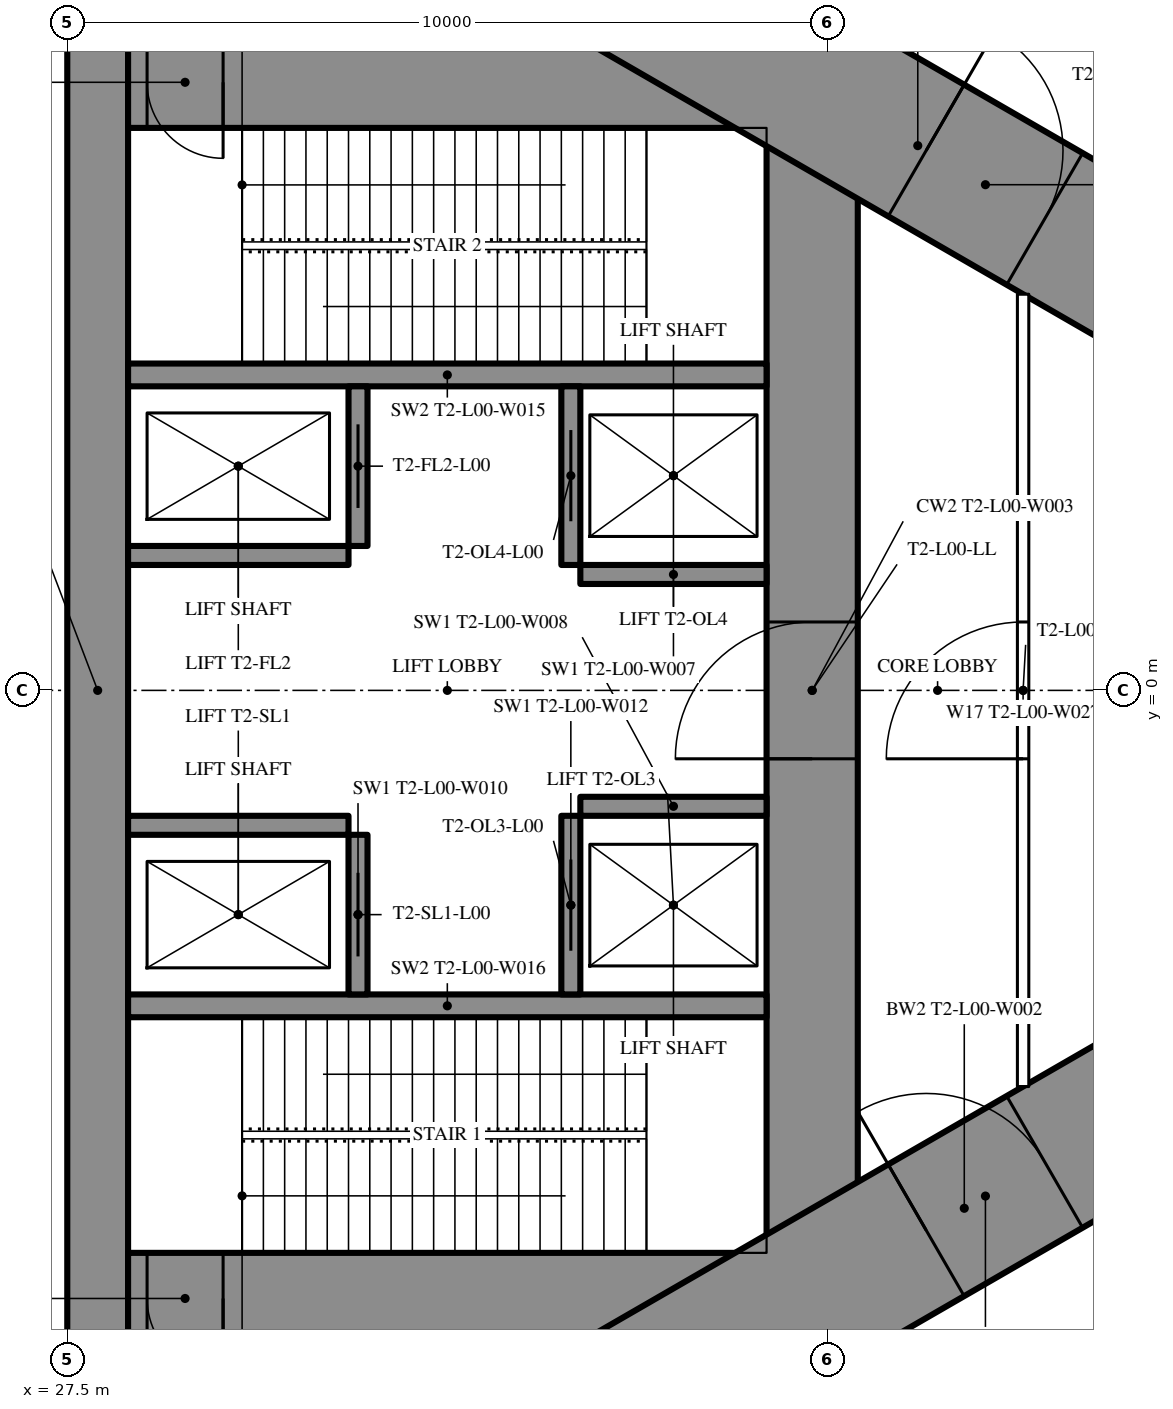
"""IFC4 building model, lengths in metres.
Left out: names, types, materials, properties, quantities, classifications, styles, units other than length and angle.
Written with IfcOpenShell. Run it as: python <this file> out.ifc"""

import sys

from ifc_helpers import new_model, si_unit, direction, frame, frame_2d, origin, place, context, subcontext, project, spatial, rectangle, extrude, element, fill, save


model = new_model("IFC4")
c1 = context("Model", 3, precision=1e-05, world=origin(), true_north=direction((0.0, 1.0)))
c2 = subcontext(c1, "Body", "Model", "MODEL_VIEW")
j1 = project(units=[si_unit("LENGTHUNIT", "METRE"), si_unit("PLANEANGLEUNIT", "RADIAN")], contexts=[c1])
p1 = place(None, origin())
s1 = spatial("IfcSite", under=j1, at=p1, CompositionType="ELEMENT")
p2 = place(p1, origin())
s2 = spatial("IfcBuilding", under=s1, at=p2, CompositionType="ELEMENT")
p3 = place(p2, origin())
s3 = spatial("IfcBuildingStorey", under=s2, at=p3, CompositionType="ELEMENT", Elevation=0.0)
p4 = place(p3, frame((27.9, -8.6, 0.0), z_axis=(0.0, 0.0, 1.0), x_axis=(0.0, 1.0, 0.0)))
e1 = element("IfcWall", 1, at=p4, inside=s3, PredefinedType="SHEAR", context=c2, shape_type="SweptSolid", body=[
    extrude(rectangle(XDim=17.2, YDim=0.8, at=frame_2d((8.6, 0.0))), origin(), (0.0, 0.0, 1.0), 7.2),
])
p5 = place(p3, frame((37.3, -8.6, 0.0), z_axis=(0.0, 0.0, 1.0), x_axis=(0.0, 1.0, 0.0)))
e2 = element("IfcWall", 2, at=p5, inside=s3, PredefinedType="SHEAR", context=c2, shape_type="SweptSolid", body=[
    extrude(rectangle(XDim=17.2, YDim=1.2, at=frame_2d((8.6, 0.0))), origin(), (0.0, 0.0, 1.0), 7.2),
])
p6 = place(p5, frame((7.7, 0.0, 0.0)))
e3 = element("IfcOpeningElement", 3, at=p6, cuts=e2, PredefinedType="OPENING", context=c2, shape_type="SweptSolid", body=[
    extrude(rectangle(XDim=1.8, YDim=2.2, at=frame_2d((0.9, 1.1))), frame((0.0, 0.61, 0.0), z_axis=(0.0, -1.0, 0.0), x_axis=(1.0, 0.0, 0.0)), (0.0, 0.0, 1.0), 1.22),
])
p7 = place(p3, frame((28.3, -8.0, 0.0), z_axis=(0.0, 0.0, 1.0), x_axis=(1.0, 0.0, 0.0)))
e4 = element("IfcWall", 4, at=p7, inside=s3, PredefinedType="SHEAR", context=c2, shape_type="SweptSolid", body=[
    extrude(rectangle(XDim=8.4, YDim=1.2, at=frame_2d((4.2, 0.0))), origin(), (0.0, 0.0, 1.0), 7.2),
])
p8 = place(p7, frame((0.25, 0.0, 0.0)))
e5 = element("IfcOpeningElement", 5, at=p8, cuts=e4, PredefinedType="OPENING", context=c2, shape_type="SweptSolid", body=[
    extrude(rectangle(XDim=1.0, YDim=2.2, at=frame_2d((0.5, 1.1))), frame((0.0, 0.61, 0.0), z_axis=(0.0, -1.0, 0.0), x_axis=(1.0, 0.0, 0.0)), (0.0, 0.0, 1.0), 1.22),
])
p9 = place(p3, frame((28.3, 8.0, 0.0), z_axis=(0.0, 0.0, 1.0), x_axis=(1.0, 0.0, 0.0)))
e6 = element("IfcWall", 6, at=p9, inside=s3, PredefinedType="SHEAR", context=c2, shape_type="SweptSolid", body=[
    extrude(rectangle(XDim=8.4, YDim=1.2, at=frame_2d((4.2, 0.0))), origin(), (0.0, 0.0, 1.0), 7.2),
])
p10 = place(p9, frame((0.25, 0.0, 0.0)))
e7 = element("IfcOpeningElement", 7, at=p10, cuts=e6, PredefinedType="OPENING", context=c2, shape_type="SweptSolid", body=[
    extrude(rectangle(XDim=1.0, YDim=2.2, at=frame_2d((0.5, 1.1))), frame((0.0, 0.61, 0.0), z_axis=(0.0, -1.0, 0.0), x_axis=(1.0, 0.0, 0.0)), (0.0, 0.0, 1.0), 1.22),
])
for number, where, z_axis, x_axis in (
    (8, (28.3, -4.15, 0.0), (0.0, 0.0, 1.0), (1.0, 0.0, 0.0)),
    (9, (28.3, 4.15, 0.0), (0.0, 0.0, 1.0), (1.0, 0.0, 0.0)),
):
    element("IfcWall", number, at=place(p3, frame(where, z_axis=z_axis, x_axis=x_axis)), inside=s3, PredefinedType="SHEAR", context=c2, shape_type="SweptSolid", body=[
        extrude(rectangle(XDim=8.4, YDim=0.3, at=frame_2d((4.2, 0.0))), origin(), (0.0, 0.0, 1.0), 7.2),
    ])
p11 = place(p3, frame((31.325, -4.0, 0.0), z_axis=(0.0, 0.0, 1.0), x_axis=(0.0, 1.0, 0.0)))
e10 = element("IfcWall", 10, at=p11, inside=s3, PredefinedType="SHEAR", context=c2, shape_type="SweptSolid", body=[
    extrude(rectangle(XDim=2.1, YDim=0.25, at=frame_2d((1.05, 0.0))), origin(), (0.0, 0.0, 1.0), 7.2),
])
p12 = place(p11, frame((0.5, 0.0, 0.0)))
e11 = element("IfcOpeningElement", 11, at=p12, cuts=e10, PredefinedType="OPENING", context=c2, shape_type="SweptSolid", body=[
    extrude(rectangle(XDim=1.1, YDim=2.2, at=frame_2d((0.55, 1.1))), frame((0.0, 0.135, 0.0), z_axis=(0.0, -1.0, 0.0), x_axis=(1.0, 0.0, 0.0)), (0.0, 0.0, 1.0), 0.27),
])
p13 = place(p3, frame((34.125, -4.0, 0.0), z_axis=(0.0, 0.0, 1.0), x_axis=(0.0, 1.0, 0.0)))
e12 = element("IfcWall", 12, at=p13, inside=s3, PredefinedType="SHEAR", context=c2, shape_type="SweptSolid", body=[
    extrude(rectangle(XDim=2.35, YDim=0.25, at=frame_2d((1.175, 0.0))), origin(), (0.0, 0.0, 1.0), 7.2),
])
p14 = place(p13, frame((0.575, 0.0, 0.0)))
e13 = element("IfcOpeningElement", 13, at=p14, cuts=e12, PredefinedType="OPENING", context=c2, shape_type="SweptSolid", body=[
    extrude(rectangle(XDim=1.2, YDim=2.2, at=frame_2d((0.6, 1.1))), frame((0.0, 0.135, 0.0), z_axis=(0.0, -1.0, 0.0), x_axis=(1.0, 0.0, 0.0)), (0.0, 0.0, 1.0), 0.27),
])
p15 = place(p3, frame((28.3, -1.775, 0.0), z_axis=(0.0, 0.0, 1.0), x_axis=(1.0, 0.0, 0.0)))
e14 = element("IfcWall", 14, at=p15, inside=s3, PredefinedType="SHEAR", context=c2, shape_type="SweptSolid", body=[
    extrude(rectangle(XDim=2.9, YDim=0.25, at=frame_2d((1.45, 0.0))), origin(), (0.0, 0.0, 1.0), 7.2),
])
p16 = place(p3, frame((34.25, -1.525, 0.0), z_axis=(0.0, 0.0, 1.0), x_axis=(1.0, 0.0, 0.0)))
e15 = element("IfcWall", 15, at=p16, inside=s3, PredefinedType="SHEAR", context=c2, shape_type="SweptSolid", body=[
    extrude(rectangle(XDim=2.45, YDim=0.25, at=frame_2d((1.225, 0.0))), origin(), (0.0, 0.0, 1.0), 7.2),
])
p17 = place(p3, frame((31.325, 1.9, 0.0), z_axis=(0.0, 0.0, 1.0), x_axis=(0.0, 1.0, 0.0)))
e16 = element("IfcWall", 16, at=p17, inside=s3, PredefinedType="SHEAR", context=c2, shape_type="SweptSolid", body=[
    extrude(rectangle(XDim=2.1, YDim=0.25, at=frame_2d((1.05, 0.0))), origin(), (0.0, 0.0, 1.0), 7.2),
])
p18 = place(p17, frame((0.5, 0.0, 0.0)))
e17 = element("IfcOpeningElement", 17, at=p18, cuts=e16, PredefinedType="OPENING", context=c2, shape_type="SweptSolid", body=[
    extrude(rectangle(XDim=1.1, YDim=2.2, at=frame_2d((0.55, 1.1))), frame((0.0, 0.135, 0.0), z_axis=(0.0, -1.0, 0.0), x_axis=(1.0, 0.0, 0.0)), (0.0, 0.0, 1.0), 0.27),
])
p19 = place(p3, frame((34.125, 1.65, 0.0), z_axis=(0.0, 0.0, 1.0), x_axis=(0.0, 1.0, 0.0)))
e18 = element("IfcWall", 18, at=p19, inside=s3, PredefinedType="SHEAR", context=c2, shape_type="SweptSolid", body=[
    extrude(rectangle(XDim=2.35, YDim=0.25, at=frame_2d((1.175, 0.0))), origin(), (0.0, 0.0, 1.0), 7.2),
])
p20 = place(p19, frame((0.575, 0.0, 0.0)))
e19 = element("IfcOpeningElement", 19, at=p20, cuts=e18, PredefinedType="OPENING", context=c2, shape_type="SweptSolid", body=[
    extrude(rectangle(XDim=1.2, YDim=2.2, at=frame_2d((0.6, 1.1))), frame((0.0, 0.135, 0.0), z_axis=(0.0, -1.0, 0.0), x_axis=(1.0, 0.0, 0.0)), (0.0, 0.0, 1.0), 0.27),
])
p21 = place(p3, frame((28.3, 1.775, 0.0), z_axis=(0.0, 0.0, 1.0), x_axis=(1.0, 0.0, 0.0)))
e20 = element("IfcWall", 20, at=p21, inside=s3, PredefinedType="SHEAR", context=c2, shape_type="SweptSolid", body=[
    extrude(rectangle(XDim=2.9, YDim=0.25, at=frame_2d((1.45, 0.0))), origin(), (0.0, 0.0, 1.0), 7.2),
])
p22 = place(p3, frame((34.25, 1.525, 0.0), z_axis=(0.0, 0.0, 1.0), x_axis=(1.0, 0.0, 0.0)))
e21 = element("IfcWall", 21, at=p22, inside=s3, PredefinedType="SHEAR", context=c2, shape_type="SweptSolid", body=[
    extrude(rectangle(XDim=2.45, YDim=0.25, at=frame_2d((1.225, 0.0))), origin(), (0.0, 0.0, 1.0), 7.2),
])
p23 = place(p3, frame((27.2, -13.8, 0.0), z_axis=(0.0, 0.0, 1.0), x_axis=(0.866027159892, 0.499996958321, 0.0)))
e22 = element("IfcWall", 22, at=p23, inside=s3, PredefinedType="SHEAR", context=c2, shape_type="SweptSolid", body=[
    extrude(rectangle(XDim=27.947, YDim=2.0, at=frame_2d((13.973, 0.0))), origin(), (0.0, 0.0, 1.0), 7.2),
])
p24 = place(p23, frame((4.6, 0.0, 0.0)))
e23 = element("IfcOpeningElement", 23, at=p24, cuts=e22, PredefinedType="OPENING", context=c2, shape_type="SweptSolid", body=[
    extrude(rectangle(XDim=1.0, YDim=2.2, at=frame_2d((0.5, 1.1))), frame((0.0, 1.01, 0.0), z_axis=(0.0, -1.0, 0.0), x_axis=(1.0, 0.0, 0.0)), (0.0, 0.0, 1.0), 2.02),
])
p25 = place(p23, frame((13.395, 0.0, 0.0)))
e24 = element("IfcOpeningElement", 24, at=p25, cuts=e22, PredefinedType="OPENING", context=c2, shape_type="SweptSolid", body=[
    extrude(rectangle(XDim=1.8, YDim=2.2, at=frame_2d((0.9, 1.1))), frame((0.0, 1.01, 0.0), z_axis=(0.0, -1.0, 0.0), x_axis=(1.0, 0.0, 0.0)), (0.0, 0.0, 1.0), 2.02),
])
p26 = place(p3, frame((27.2, 13.8, 0.0), z_axis=(0.0, 0.0, 1.0), x_axis=(0.866024545924, -0.500001485854, 0.0)))
e25 = element("IfcWall", 25, at=p26, inside=s3, PredefinedType="SHEAR", context=c2, shape_type="SweptSolid", body=[
    extrude(rectangle(XDim=26.534, YDim=2.0, at=frame_2d((13.267, 0.0))), origin(), (0.0, 0.0, 1.0), 7.2),
])
p27 = place(p26, frame((4.6, 0.0, 0.0)))
e26 = element("IfcOpeningElement", 26, at=p27, cuts=e25, PredefinedType="OPENING", context=c2, shape_type="SweptSolid", body=[
    extrude(rectangle(XDim=1.0, YDim=2.2, at=frame_2d((0.5, 1.1))), frame((0.0, 1.01, 0.0), z_axis=(0.0, -1.0, 0.0), x_axis=(1.0, 0.0, 0.0)), (0.0, 0.0, 1.0), 2.02),
])
p28 = place(p26, frame((13.395, 0.0, 0.0)))
e27 = element("IfcOpeningElement", 27, at=p28, cuts=e25, PredefinedType="OPENING", context=c2, shape_type="SweptSolid", body=[
    extrude(rectangle(XDim=1.8, YDim=2.2, at=frame_2d((0.9, 1.1))), frame((0.0, 1.01, 0.0), z_axis=(0.0, -1.0, 0.0), x_axis=(1.0, 0.0, 0.0)), (0.0, 0.0, 1.0), 2.02),
])
p29 = place(p3, frame((38.16, -10.59, 0.0), z_axis=(0.0, 0.0, 1.0), x_axis=(0.866027029586, 0.499997184019, 0.0)))
e28 = element("IfcWall", 28, at=p29, inside=s3, PredefinedType="PARTITIONING", context=c2, shape_type="SweptSolid", body=[
    extrude(rectangle(XDim=21.18, YDim=0.2, at=frame_2d((10.59, 0.0))), origin(), (0.0, 0.0, 1.0), 6.85),
])
p30 = place(p29, frame((14.142, 0.0, 0.0)))
e29 = element("IfcOpeningElement", 29, at=p30, cuts=e28, PredefinedType="OPENING", context=c2, shape_type="SweptSolid", body=[
    extrude(rectangle(XDim=1.8, YDim=2.2, at=frame_2d((0.9, 1.1))), frame((0.0, 0.11, 0.0), z_axis=(0.0, -1.0, 0.0), x_axis=(1.0, 0.0, 0.0)), (0.0, 0.0, 1.0), 0.22),
])
p31 = place(p29, frame((18.183, 0.0, 0.0)))
e30 = element("IfcOpeningElement", 30, at=p31, cuts=e28, PredefinedType="OPENING", context=c2, shape_type="SweptSolid", body=[
    extrude(rectangle(XDim=1.8, YDim=2.2, at=frame_2d((0.9, 1.1))), frame((0.0, 0.11, 0.0), z_axis=(0.0, -1.0, 0.0), x_axis=(1.0, 0.0, 0.0)), (0.0, 0.0, 1.0), 0.22),
])
p32 = place(p29, frame((5.65, 0.0, 0.0)))
e31 = element("IfcOpeningElement", 31, at=p32, cuts=e28, PredefinedType="OPENING", context=c2, shape_type="SweptSolid", body=[
    extrude(rectangle(XDim=1.8, YDim=2.2, at=frame_2d((0.9, 1.1))), frame((0.0, 0.11, 0.0), z_axis=(0.0, -1.0, 0.0), x_axis=(1.0, 0.0, 0.0)), (0.0, 0.0, 1.0), 0.22),
])
p33 = place(p3, frame((37.034, 11.24, 0.0), z_axis=(0.0, 0.0, 1.0), x_axis=(0.866025942536, -0.499999066854, 0.0)))
e32 = element("IfcWall", 32, at=p33, inside=s3, PredefinedType="PARTITIONING", context=c2, shape_type="SweptSolid", body=[
    extrude(rectangle(XDim=22.36, YDim=0.2, at=frame_2d((11.18, 0.0))), origin(), (0.0, 0.0, 1.0), 6.85),
])
p34 = place(p33, frame((19.423, 0.0, 0.0)))
e33 = element("IfcOpeningElement", 33, at=p34, cuts=e32, PredefinedType="OPENING", context=c2, shape_type="SweptSolid", body=[
    extrude(rectangle(XDim=1.8, YDim=2.2, at=frame_2d((0.9, 1.1))), frame((0.0, 0.11, 0.0), z_axis=(0.0, -1.0, 0.0), x_axis=(1.0, 0.0, 0.0)), (0.0, 0.0, 1.0), 0.22),
])
p35 = place(p33, frame((13.174, 0.0, 0.0)))
e34 = element("IfcOpeningElement", 34, at=p35, cuts=e32, PredefinedType="OPENING", context=c2, shape_type="SweptSolid", body=[
    extrude(rectangle(XDim=2.0, YDim=2.4, at=frame_2d((1.0, 1.2))), frame((0.0, 0.11, 0.0), z_axis=(0.0, -1.0, 0.0), x_axis=(1.0, 0.0, 0.0)), (0.0, 0.0, 1.0), 0.22),
])
p36 = place(p33, frame((4.602, 0.0, 0.0)))
e35 = element("IfcOpeningElement", 35, at=p36, cuts=e32, PredefinedType="OPENING", context=c2, shape_type="SweptSolid", body=[
    extrude(rectangle(XDim=1.8, YDim=2.2, at=frame_2d((0.9, 1.1))), frame((0.0, 0.11, 0.0), z_axis=(0.0, -1.0, 0.0), x_axis=(1.0, 0.0, 0.0)), (0.0, 0.0, 1.0), 0.22),
])
p37 = place(p3, frame((40.075, -5.212, 0.0), z_axis=(0.0, 0.0, 1.0), x_axis=(0.0, 1.0, 0.0)))
e36 = element("IfcWall", 36, at=p37, inside=s3, PredefinedType="PARTITIONING", context=c2, shape_type="SweptSolid", body=[
    extrude(rectangle(XDim=10.424, YDim=0.15, at=frame_2d((5.212, 0.0))), origin(), (0.0, 0.0, 1.0), 6.85),
])
p38 = place(p37, frame((4.312, 0.0, 0.0)))
e37 = element("IfcOpeningElement", 37, at=p38, cuts=e36, PredefinedType="OPENING", context=c2, shape_type="SweptSolid", body=[
    extrude(rectangle(XDim=1.8, YDim=2.2, at=frame_2d((0.9, 1.1))), frame((0.0, 0.085, 0.0), z_axis=(0.0, -1.0, 0.0), x_axis=(1.0, 0.0, 0.0)), (0.0, 0.0, 1.0), 0.17),
])
p39 = place(p3, frame((4.625, -4.95, 0.0), z_axis=(0.0, 0.0, 1.0), x_axis=(1.0, 0.0, 0.0)))
e38 = element("IfcWall", 38, at=p39, inside=s3, PredefinedType="PARTITIONING", context=c2, shape_type="SweptSolid", body=[
    extrude(rectangle(XDim=22.875, YDim=0.15, at=frame_2d((11.438, 0.0))), origin(), (0.0, 0.0, 1.0), 5.85),
])
p40 = place(p39, frame((9.0, 0.0, 0.0)))
e39 = element("IfcOpeningElement", 39, at=p40, cuts=e38, PredefinedType="OPENING", context=c2, shape_type="SweptSolid", body=[
    extrude(rectangle(XDim=1.8, YDim=2.2, at=frame_2d((0.9, 1.1))), frame((0.0, 0.085, 0.0), z_axis=(0.0, -1.0, 0.0), x_axis=(1.0, 0.0, 0.0)), (0.0, 0.0, 1.0), 0.17),
])
p41 = place(p38, origin())
e40 = element("IfcDoor", 40, at=p41, inside=s3, OperationType="DOUBLE_DOOR_SINGLE_SWING", PredefinedType="DOOR", context=c2, shape_type="SweptSolid", body=[
    extrude(rectangle(XDim=1.8, YDim=2.2, at=frame_2d((0.9, 1.1))), frame((0.0, 0.025, 0.0), z_axis=(0.0, -1.0, 0.0), x_axis=(1.0, 0.0, 0.0)), (0.0, 0.0, 1.0), 0.05),
])
fill(e37, e40)
p42 = place(p25, origin())
e41 = element("IfcDoor", 41, at=p42, inside=s3, OperationType="DOUBLE_DOOR_SINGLE_SWING", PredefinedType="DOOR", context=c2, shape_type="SweptSolid", body=[
    extrude(rectangle(XDim=1.8, YDim=2.2, at=frame_2d((0.9, 1.1))), frame((0.0, 0.025, 0.0), z_axis=(0.0, -1.0, 0.0), x_axis=(1.0, 0.0, 0.0)), (0.0, 0.0, 1.0), 0.05),
])
fill(e24, e41)
p43 = place(p28, origin())
e42 = element("IfcDoor", 42, at=p43, inside=s3, OperationType="DOUBLE_DOOR_SINGLE_SWING", PredefinedType="DOOR", context=c2, shape_type="SweptSolid", body=[
    extrude(rectangle(XDim=1.8, YDim=2.2, at=frame_2d((0.9, 1.1))), frame((0.0, 0.025, 0.0), z_axis=(0.0, -1.0, 0.0), x_axis=(1.0, 0.0, 0.0)), (0.0, 0.0, 1.0), 0.05),
])
fill(e27, e42)
p44 = place(p6, origin())
e43 = element("IfcDoor", 43, at=p44, inside=s3, OperationType="DOUBLE_DOOR_SINGLE_SWING", PredefinedType="DOOR", context=c2, shape_type="SweptSolid", body=[
    extrude(rectangle(XDim=1.8, YDim=2.2, at=frame_2d((0.9, 1.1))), frame((0.0, 0.025, 0.0), z_axis=(0.0, -1.0, 0.0), x_axis=(1.0, 0.0, 0.0)), (0.0, 0.0, 1.0), 0.05),
])
fill(e3, e43)
p45 = place(p8, origin())
e44 = element("IfcDoor", 44, at=p45, inside=s3, OperationType="SINGLE_SWING_RIGHT", PredefinedType="DOOR", context=c2, shape_type="SweptSolid", body=[
    extrude(rectangle(XDim=1.0, YDim=2.2, at=frame_2d((0.5, 1.1))), frame((0.0, 0.025, 0.0), z_axis=(0.0, -1.0, 0.0), x_axis=(1.0, 0.0, 0.0)), (0.0, 0.0, 1.0), 0.05),
])
fill(e5, e44)
p46 = place(p10, origin())
e45 = element("IfcDoor", 45, at=p46, inside=s3, OperationType="SINGLE_SWING_RIGHT", PredefinedType="DOOR", context=c2, shape_type="SweptSolid", body=[
    extrude(rectangle(XDim=1.0, YDim=2.2, at=frame_2d((0.5, 1.1))), frame((0.0, 0.025, 0.0), z_axis=(0.0, -1.0, 0.0), x_axis=(1.0, 0.0, 0.0)), (0.0, 0.0, 1.0), 0.05),
])
fill(e7, e45)
p47 = place(p12, origin())
e46 = element("IfcDoor", 46, at=p47, inside=s3, OperationType="SLIDING_TO_LEFT", PredefinedType="USERDEFINED", context=c2, shape_type="SweptSolid", body=[
    extrude(rectangle(XDim=1.1, YDim=2.2, at=frame_2d((0.55, 1.1))), frame((0.0, 0.025, 0.0), z_axis=(0.0, -1.0, 0.0), x_axis=(1.0, 0.0, 0.0)), (0.0, 0.0, 1.0), 0.05),
])
fill(e11, e46)
p48 = place(p18, origin())
e47 = element("IfcDoor", 47, at=p48, inside=s3, OperationType="SLIDING_TO_LEFT", PredefinedType="USERDEFINED", context=c2, shape_type="SweptSolid", body=[
    extrude(rectangle(XDim=1.1, YDim=2.2, at=frame_2d((0.55, 1.1))), frame((0.0, 0.025, 0.0), z_axis=(0.0, -1.0, 0.0), x_axis=(1.0, 0.0, 0.0)), (0.0, 0.0, 1.0), 0.05),
])
fill(e17, e47)
p49 = place(p14, origin())
e48 = element("IfcDoor", 48, at=p49, inside=s3, OperationType="DOUBLE_DOOR_SLIDING", PredefinedType="USERDEFINED", context=c2, shape_type="SweptSolid", body=[
    extrude(rectangle(XDim=1.2, YDim=2.2, at=frame_2d((0.6, 1.1))), frame((0.0, 0.025, 0.0), z_axis=(0.0, -1.0, 0.0), x_axis=(1.0, 0.0, 0.0)), (0.0, 0.0, 1.0), 0.05),
])
fill(e13, e48)
p50 = place(p20, origin())
e49 = element("IfcDoor", 49, at=p50, inside=s3, OperationType="DOUBLE_DOOR_SLIDING", PredefinedType="USERDEFINED", context=c2, shape_type="SweptSolid", body=[
    extrude(rectangle(XDim=1.2, YDim=2.2, at=frame_2d((0.6, 1.1))), frame((0.0, 0.025, 0.0), z_axis=(0.0, -1.0, 0.0), x_axis=(1.0, 0.0, 0.0)), (0.0, 0.0, 1.0), 0.05),
])
fill(e19, e49)
save(model, sys.argv[1])
